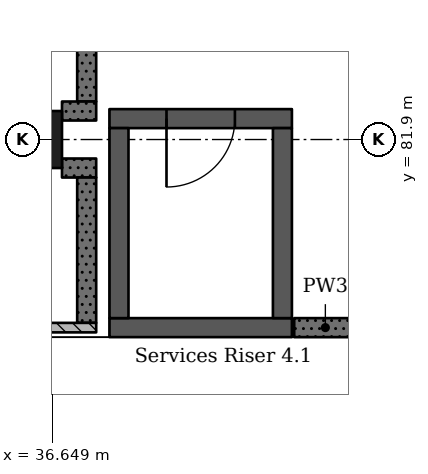
"""IFC4 building model, lengths in metres.
Left out: names, types, materials, properties, quantities, classifications, styles, units other than length and angle.
Written with IfcOpenShell. Run it as: python <this file> out.ifc"""

import sys

from ifc_helpers import new_model, si_unit, direction, frame, frame_2d, origin, origin_2d, place, context, subcontext, project, spatial, rectangle, extrude, element, fill, save


model = new_model("IFC4")
c1 = context("Model", 3, precision=1e-05, world=origin(), true_north=direction((0.0, 1.0)))
c2 = subcontext(c1, "Body", "Model", "MODEL_VIEW")
j1 = project(units=[si_unit("LENGTHUNIT", "METRE"), si_unit("PLANEANGLEUNIT", "RADIAN")], contexts=[c1])
p1 = place(None, origin())
s1 = spatial("IfcSite", under=j1, at=p1, CompositionType="ELEMENT")
p2 = place(p1, origin())
s2 = spatial("IfcBuilding", under=s1, at=p2, CompositionType="ELEMENT")
p3 = place(p2, frame((0.0, 0.0, 10.92)))
s3 = spatial("IfcBuildingStorey", under=s2, at=p3, CompositionType="ELEMENT", Elevation=10.92)
p4 = place(p3, frame((36.4, 81.9, 0.0), z_axis=(0.0, 0.0, 1.0), x_axis=(1.0, 0.0, 0.0)))
e1 = element("IfcColumn", 1, at=p4, inside=s3, PredefinedType="COLUMN", context=c2, shape_type="SweptSolid", body=[
    extrude(rectangle(XDim=0.75, YDim=0.75, at=origin_2d()), origin(), (0.0, 0.0, 1.0), 4.55),
])
p5 = place(p3, frame((39.8, 79.425, 0.0), z_axis=(0.0, 0.0, 1.0), x_axis=(-1.0, 0.0, 0.0)))
e2 = element("IfcWall", 2, at=p5, inside=s3, PredefinedType="SHEAR", context=c2, shape_type="SweptSolid", body=[
    extrude(rectangle(XDim=2.4, YDim=0.25, at=frame_2d((1.2, 0.0))), origin(), (0.0, 0.0, 1.0), 4.55),
])
p6 = place(p3, frame((39.8, 82.175, 0.0), z_axis=(0.0, 0.0, 1.0), x_axis=(-1.0, 0.0, 0.0)))
e3 = element("IfcWall", 3, at=p6, inside=s3, PredefinedType="SHEAR", context=c2, shape_type="SweptSolid", body=[
    extrude(rectangle(XDim=2.4, YDim=0.25, at=frame_2d((1.2, 0.0))), origin(), (0.0, 0.0, 1.0), 4.55),
])
p7 = place(p6, frame((0.75, 0.0, 0.0)))
e4 = element("IfcOpeningElement", 4, at=p7, cuts=e3, PredefinedType="OPENING", context=c2, shape_type="SweptSolid", body=[
    extrude(rectangle(XDim=0.9, YDim=2.1, at=frame_2d((0.45, 1.05))), frame((0.0, 0.135, 0.0), z_axis=(0.0, -1.0, 0.0), x_axis=(1.0, 0.0, 0.0)), (0.0, 0.0, 1.0), 0.27),
])
for number, where, z_axis, x_axis in (
    (5, (37.525, 82.05, 0.0), (0.0, 0.0, 1.0), (0.0, -1.0, 0.0)),
    (6, (39.675, 82.05, 0.0), (0.0, 0.0, 1.0), (0.0, -1.0, 0.0)),
):
    element("IfcWall", number, at=place(p3, frame(where, z_axis=z_axis, x_axis=x_axis)), inside=s3, PredefinedType="SHEAR", context=c2, shape_type="SweptSolid", body=[
        extrude(rectangle(XDim=2.5, YDim=0.25, at=frame_2d((1.25, 0.0))), origin(), (0.0, 0.0, 1.0), 4.55),
    ])
p8 = place(p3, frame((33.337, 79.425, 0.0), z_axis=(0.0, 0.0, 1.0), x_axis=(1.0, 0.0, 0.0)))
e7 = element("IfcWall", 7, at=p8, inside=s3, PredefinedType="PARTITIONING", context=c2, shape_type="SweptSolid", body=[
    extrude(rectangle(XDim=3.888, YDim=0.125, at=frame_2d((1.944, 0.0))), origin(), (0.0, 0.0, 1.0), 4.25),
])
p9 = place(p3, frame((36.775, 81.525, 0.0), z_axis=(0.0, 0.0, 1.0), x_axis=(1.0, 0.0, 0.0)))
e8 = element("IfcWall", 8, at=p9, inside=s3, PredefinedType="SOLIDWALL", context=c2, shape_type="SweptSolid", body=[
    extrude(rectangle(XDim=0.45, YDim=0.25, at=frame_2d((0.225, 0.0))), origin(), (0.0, 0.0, 1.0), 4.25),
])
p10 = place(p3, frame((37.1, 81.4, 0.0), z_axis=(0.0, 0.0, 1.0), x_axis=(0.0, -1.0, 0.0)))
e9 = element("IfcWall", 9, at=p10, inside=s3, PredefinedType="SOLIDWALL", context=c2, shape_type="SweptSolid", body=[
    extrude(rectangle(XDim=1.912, YDim=0.25, at=frame_2d((0.956, 0.0))), origin(), (0.0, 0.0, 1.0), 4.25),
])
p11 = place(p3, frame((37.1, 89.275, 0.0), z_axis=(0.0, 0.0, 1.0), x_axis=(0.0, -1.0, 0.0)))
e10 = element("IfcWall", 10, at=p11, inside=s3, PredefinedType="SOLIDWALL", context=c2, shape_type="SweptSolid", body=[
    extrude(rectangle(XDim=6.875, YDim=0.25, at=frame_2d((3.438, 0.0))), origin(), (0.0, 0.0, 1.0), 4.25),
])
p12 = place(p3, frame((37.225, 82.275, 0.0), z_axis=(0.0, 0.0, 1.0), x_axis=(-1.0, 0.0, 0.0)))
e11 = element("IfcWall", 11, at=p12, inside=s3, PredefinedType="SOLIDWALL", context=c2, shape_type="SweptSolid", body=[
    extrude(rectangle(XDim=0.45, YDim=0.25, at=frame_2d((0.225, 0.0))), origin(), (0.0, 0.0, 1.0), 4.25),
])
p13 = place(p3, frame((40.65, 79.425, 0.0), z_axis=(0.0, 0.0, 1.0), x_axis=(-1.0, 0.0, 0.0)))
e12 = element("IfcWall", 12, at=p13, inside=s3, PredefinedType="SOLIDWALL", context=c2, shape_type="SweptSolid", body=[
    extrude(rectangle(XDim=0.82, YDim=0.25, at=frame_2d((0.41, 0.0))), origin(), (0.0, 0.0, 1.0), 4.25),
])
p14 = place(p7, origin())
e13 = element("IfcDoor", 13, at=p14, inside=s3, OperationType="SINGLE_SWING_LEFT", PredefinedType="DOOR", context=c2, shape_type="SweptSolid", body=[
    extrude(rectangle(XDim=0.9, YDim=2.1, at=frame_2d((0.45, 1.05))), frame((0.0, 0.025, 0.0), z_axis=(0.0, -1.0, 0.0), x_axis=(1.0, 0.0, 0.0)), (0.0, 0.0, 1.0), 0.05),
])
fill(e4, e13)
save(model, sys.argv[1])
